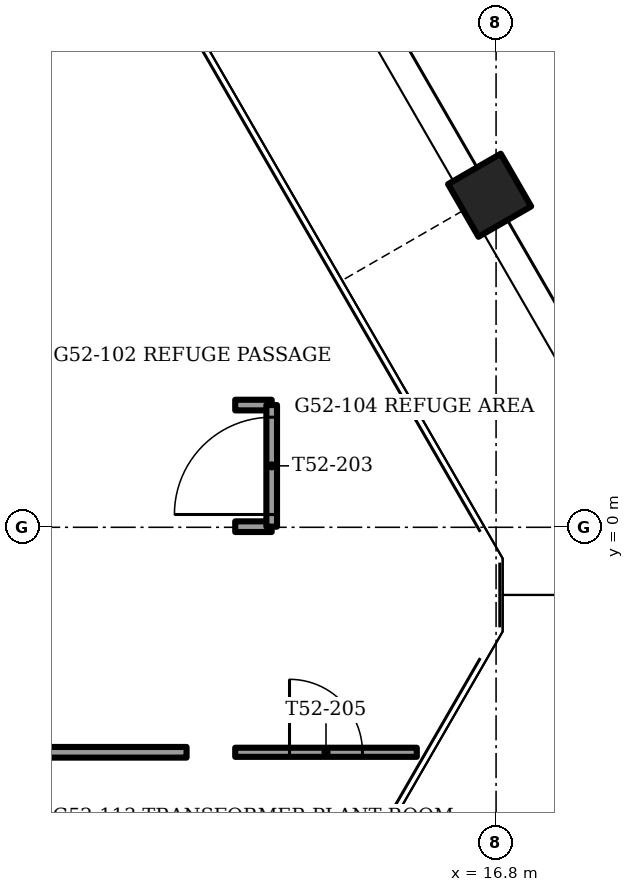
"""IFC4 building model, lengths in metres.
Left out: names, types, materials, properties, quantities, classifications, styles, units other than length and angle.
Written with IfcOpenShell. Run it as: python <this file> out.ifc"""

import sys

from ifc_helpers import new_model, si_unit, direction, frame, frame_2d, origin, origin_2d, place, context, subcontext, project, spatial, rectangle, extrude, element, fill, save


model = new_model("IFC4")
c1 = context("Model", 3, precision=1e-05, world=origin(), true_north=direction((0.0, 1.0)))
c2 = subcontext(c1, "Body", "Model", "MODEL_VIEW")
j1 = project(units=[si_unit("LENGTHUNIT", "METRE"), si_unit("PLANEANGLEUNIT", "RADIAN")], contexts=[c1])
p1 = place(None, origin())
s1 = spatial("IfcSite", under=j1, at=p1, CompositionType="ELEMENT")
p2 = place(p1, origin())
s2 = spatial("IfcBuilding", under=s1, at=p2, CompositionType="ELEMENT")
p3 = place(p2, frame((0.0, 0.0, 209.5)))
s3 = spatial("IfcBuildingStorey", under=s2, at=p3, CompositionType="ELEMENT", Elevation=209.5)
p4 = place(p3, frame((16.694, 5.46, -1.2), z_axis=(0.0, 0.0, 1.0), x_axis=(0.5, -0.866025403784, 0.0)))
e1 = element("IfcColumn", 1, at=p4, inside=s3, PredefinedType="COLUMN", context=c2, shape_type="SweptSolid", body=[
    extrude(rectangle(XDim=1.0, YDim=1.0, at=origin_2d()), origin(), (0.0, 0.0, 1.0), 5.0),
])
p5 = place(p3, frame((9.38, -3.7, 0.0), z_axis=(0.0, 0.0, 1.0), x_axis=(1.0, 0.0, 0.0)))
e2 = element("IfcWall", 2, at=p5, inside=s3, PredefinedType="PARTITIONING", context=c2, shape_type="SweptSolid", body=[
    extrude(rectangle(XDim=2.33, YDim=0.175, at=frame_2d((1.165, 0.0))), origin(), (0.0, 0.0, 1.0), 4.7),
])
for number, where, z_axis, x_axis in (
    (3, (12.51, 0.01, 0.0), (0.0, 0.0, 1.0), (1.0, 0.0, 0.0)),
    (4, (12.51, 2.01, 0.0), (0.0, 0.0, 1.0), (1.0, 0.0, 0.0)),
):
    element("IfcWall", number, at=place(p3, frame(where, z_axis=z_axis, x_axis=x_axis)), inside=s3, PredefinedType="PARTITIONING", context=c2, shape_type="SweptSolid", body=[
        extrude(rectangle(XDim=0.6, YDim=0.175, at=frame_2d((0.3, 0.0))), origin(), (0.0, 0.0, 1.0), 4.7),
    ])
p6 = place(p3, frame((13.11, 0.01, 0.0), z_axis=(0.0, 0.0, 1.0), x_axis=(0.0, 1.0, 0.0)))
e5 = element("IfcWall", 5, at=p6, inside=s3, PredefinedType="PARTITIONING", context=c2, shape_type="SweptSolid", body=[
    extrude(rectangle(XDim=2.0, YDim=0.175, at=frame_2d((1.0, 0.0))), origin(), (0.0, 0.0, 1.0), 4.7),
])
p7 = place(p6, frame((0.2, 0.0, 0.0)))
e6 = element("IfcOpeningElement", 6, at=p7, cuts=e5, PredefinedType="OPENING", context=c2, shape_type="SweptSolid", body=[
    extrude(rectangle(XDim=1.6, YDim=2.1, at=frame_2d((0.8, 1.05))), frame((0.0, 0.087, 0.0), z_axis=(0.0, -1.0, 0.0), x_axis=(1.0, 0.0, 0.0)), (0.0, 0.0, 1.0), 0.175),
])
p8 = place(p3, frame((12.51, -3.7, 0.0), z_axis=(0.0, 0.0, 1.0), x_axis=(1.0, 0.0, 0.0)))
e7 = element("IfcWall", 7, at=p8, inside=s3, PredefinedType="PARTITIONING", context=c2, shape_type="SweptSolid", body=[
    extrude(rectangle(XDim=2.986, YDim=0.15, at=frame_2d((1.493, 0.0))), origin(), (0.0, 0.0, 1.0), 4.7),
])
p9 = place(p8, frame((0.893, 0.0, 0.0)))
e8 = element("IfcOpeningElement", 8, at=p9, cuts=e7, PredefinedType="OPENING", context=c2, shape_type="SweptSolid", body=[
    extrude(rectangle(XDim=1.2, YDim=2.1, at=frame_2d((0.6, 1.05))), frame((0.0, 0.075, 0.0), z_axis=(0.0, -1.0, 0.0), x_axis=(1.0, 0.0, 0.0)), (0.0, 0.0, 1.0), 0.15),
])
p10 = place(p7, origin())
e9 = element("IfcDoor", 9, at=p10, inside=s3, OperationType="DOUBLE_DOOR_SINGLE_SWING", PredefinedType="DOOR", context=c2, shape_type="SweptSolid", body=[
    extrude(rectangle(XDim=1.6, YDim=2.1, at=frame_2d((0.8, 1.05))), frame((0.0, 0.025, 0.0), z_axis=(0.0, -1.0, 0.0), x_axis=(1.0, 0.0, 0.0)), (0.0, 0.0, 1.0), 0.05),
])
fill(e6, e9)
p11 = place(p9, origin())
e10 = element("IfcDoor", 10, at=p11, inside=s3, OperationType="SINGLE_SWING_LEFT", PredefinedType="DOOR", context=c2, shape_type="SweptSolid", body=[
    extrude(rectangle(XDim=1.2, YDim=2.1, at=frame_2d((0.6, 1.05))), frame((0.0, 0.025, 0.0), z_axis=(0.0, -1.0, 0.0), x_axis=(1.0, 0.0, 0.0)), (0.0, 0.0, 1.0), 0.05),
])
fill(e8, e10)
save(model, sys.argv[1])
